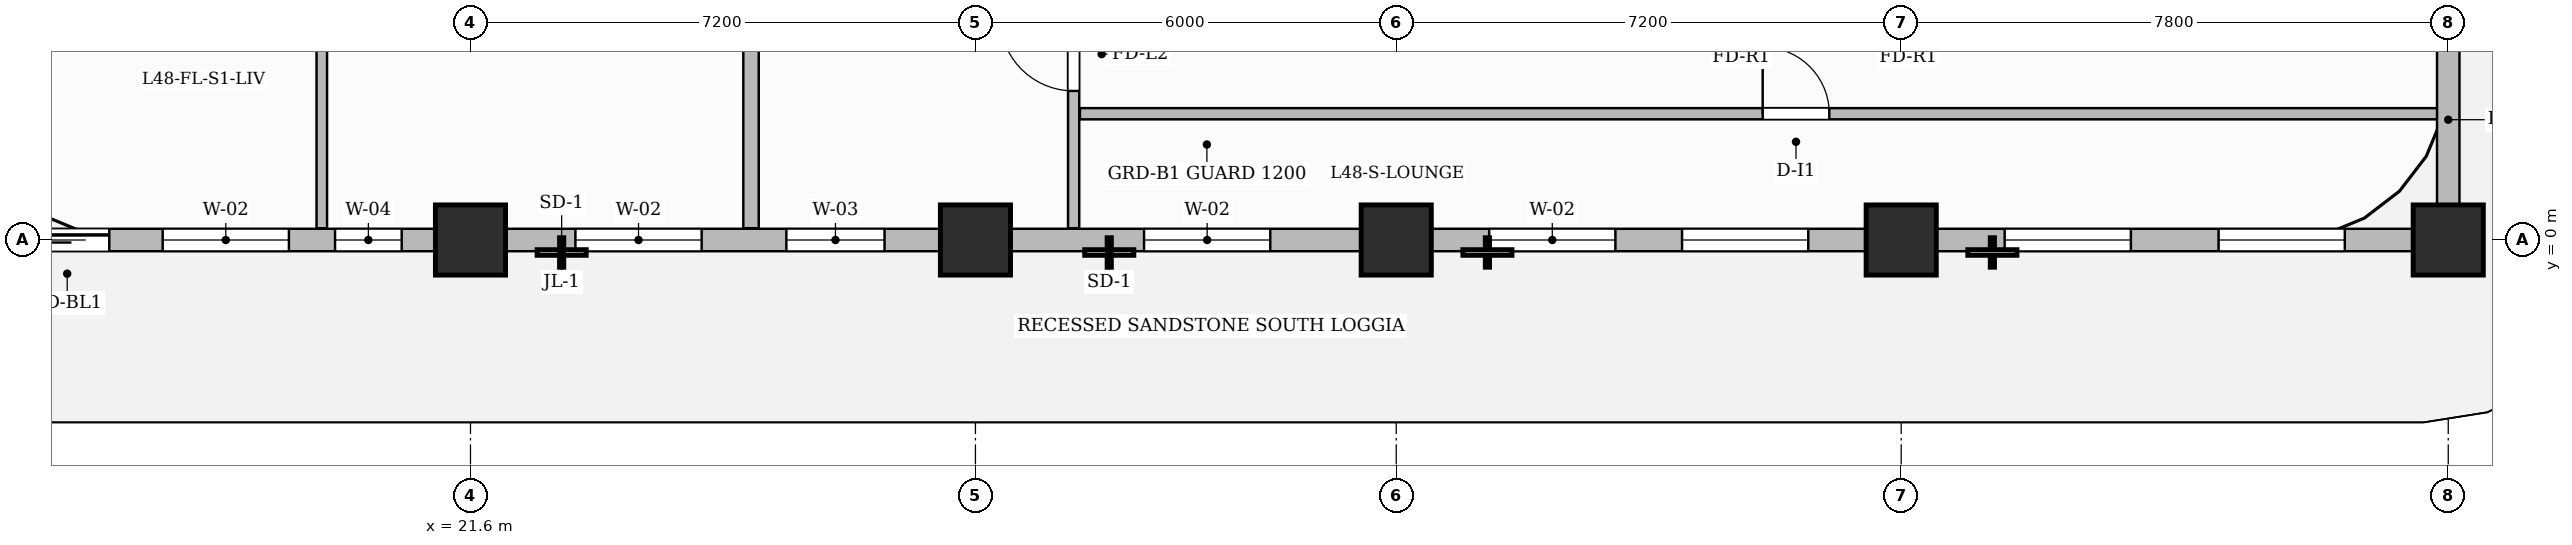
"""IFC4 building model, lengths in metres.
Left out: names, types, materials, properties, quantities, classifications, styles, units other than length and angle.
Written with IfcOpenShell. Run it as: python <this file> out.ifc"""

import sys

from ifc_helpers import new_model, si_unit, direction, frame, frame_2d, origin, origin_2d, place, context, subcontext, project, spatial, rectangle, extrude, source, transform, mapped, element, fill, save


model = new_model("IFC4")
c1 = context("Model", 3, precision=1e-05, world=origin(), true_north=direction((0.0, 1.0)))
c2 = subcontext(c1, "Body", "Model", "MODEL_VIEW")
j1 = project(units=[si_unit("LENGTHUNIT", "METRE"), si_unit("PLANEANGLEUNIT", "RADIAN")], contexts=[c1])
p1 = place(None, origin())
s1 = spatial("IfcSite", under=j1, at=p1, CompositionType="ELEMENT")
p2 = place(p1, origin())
s2 = spatial("IfcBuilding", under=s1, at=p2, CompositionType="ELEMENT")
p3 = place(p2, frame((0.0, 0.0, 192.65)))
s3 = spatial("IfcBuildingStorey", under=s2, at=p3, CompositionType="ELEMENT", Elevation=192.65)
m1 = source(origin(), c2, "Body", "SweptSolid", [
    extrude(rectangle(XDim=1.0, YDim=1.0, at=origin_2d()), origin(), (0.0, 0.0, 1.0), 3.85),
])
for number, where, z_axis, x_axis in (
    (1, (21.6, 0.0, 0.0), (0.0, 0.0, 1.0), (1.0, 0.0, 0.0)),
    (2, (28.8, 0.0, 0.0), (0.0, 0.0, 1.0), (1.0, 0.0, 0.0)),
    (3, (34.8, 0.0, 0.0), (0.0, 0.0, 1.0), (1.0, 0.0, 0.0)),
    (4, (42.0, 0.0, 0.0), (0.0, 0.0, 1.0), (1.0, 0.0, 0.0)),
    (5, (49.8, 0.0, 0.0), (0.0, 0.0, 1.0), (1.0, 0.0, 0.0)),
):
    element("IfcColumn", number, at=place(p3, frame(where, z_axis=z_axis, x_axis=x_axis)), inside=s3, PredefinedType="COLUMN", context=c2, shape_type="MappedRepresentation", body=[
        mapped(m1, transform((0.0, 0.0, 0.0), scale=1.0)),
    ])
p4 = place(p3, frame((30.2, 0.168, 0.0), z_axis=(0.0, 0.0, 1.0), x_axis=(0.0, 1.0, 0.0)))
e6 = element("IfcWall", 6, at=p4, inside=s3, PredefinedType="PARTITIONING", context=c2, shape_type="SweptSolid", body=[
    extrude(rectangle(XDim=9.892, YDim=0.16, at=frame_2d((4.946, 0.0))), origin(), (0.0, 0.0, 1.0), 3.55),
])
p5 = place(p4, frame((1.957, 0.0, 0.0)))
e7 = element("IfcOpeningElement", 7, at=p5, cuts=e6, PredefinedType="OPENING", context=c2, shape_type="SweptSolid", body=[
    extrude(rectangle(XDim=1.05, YDim=2.15, at=frame_2d((0.525, 1.075))), frame((0.0, 0.09, 0.0), z_axis=(0.0, -1.0, 0.0), x_axis=(1.0, 0.0, 0.0)), (0.0, 0.0, 1.0), 0.18),
])
p6 = place(p3, frame((30.29, 1.8, 0.0), z_axis=(0.0, 0.0, 1.0), x_axis=(1.0, 0.0, 0.0)))
e8 = element("IfcWall", 8, at=p6, inside=s3, PredefinedType="PARTITIONING", context=c2, shape_type="SweptSolid", body=[
    extrude(rectangle(XDim=19.37, YDim=0.16, at=frame_2d((9.685, 0.0))), origin(), (0.0, 0.0, 1.0), 3.55),
])
p7 = place(p6, frame((9.735, 0.0, 0.0)))
e9 = element("IfcOpeningElement", 9, at=p7, cuts=e8, PredefinedType="OPENING", context=c2, shape_type="SweptSolid", body=[
    extrude(rectangle(XDim=0.95, YDim=2.15, at=frame_2d((0.475, 1.075))), frame((0.0, 0.09, 0.0), z_axis=(0.0, -1.0, 0.0), x_axis=(1.0, 0.0, 0.0)), (0.0, 0.0, 1.0), 0.18),
])
p8 = place(p3, frame((25.6, 0.168, 0.0), z_axis=(0.0, 0.0, 1.0), x_axis=(0.0, 1.0, 0.0)))
e10 = element("IfcWall", 10, at=p8, inside=s3, PredefinedType="PARTITIONING", context=c2, shape_type="SweptSolid", body=[
    extrude(rectangle(XDim=9.892, YDim=0.22, at=frame_2d((4.946, 0.0))), origin(), (0.0, 0.0, 1.0), 3.55),
])
p9 = place(p3, frame((19.48, 0.168, 0.0), z_axis=(0.0, 0.0, 1.0), x_axis=(0.0, 1.0, 0.0)))
e11 = element("IfcWall", 11, at=p9, inside=s3, PredefinedType="PARTITIONING", context=c2, shape_type="SweptSolid", body=[
    extrude(rectangle(XDim=9.892, YDim=0.15, at=frame_2d((4.946, 0.0))), origin(), (0.0, 0.0, 1.0), 3.55),
])
p10 = place(p9, frame((8.457, 0.0, 0.0)))
e12 = element("IfcOpeningElement", 12, at=p10, cuts=e11, PredefinedType="OPENING", context=c2, shape_type="SweptSolid", body=[
    extrude(rectangle(XDim=0.9, YDim=2.15, at=frame_2d((0.45, 1.075))), frame((0.0, 0.085, 0.0), z_axis=(0.0, -1.0, 0.0), x_axis=(1.0, 0.0, 0.0)), (0.0, 0.0, 1.0), 0.17),
])
p11 = place(p3, frame((14.4, 0.0, 0.0), z_axis=(0.0, 0.0, 1.0), x_axis=(1.0, 0.0, 0.0)))
e13 = element("IfcWall", 13, at=p11, inside=s3, PredefinedType="SOLIDWALL", context=c2, shape_type="SweptSolid", body=[
    extrude(rectangle(XDim=35.4, YDim=0.32, at=frame_2d((17.7, 0.0))), origin(), (0.0, 0.0, 1.0), 3.035),
])
p12 = place(p11, frame((0.85, 0.0, 0.0)))
e14 = element("IfcOpeningElement", 14, at=p12, cuts=e13, PredefinedType="OPENING", context=c2, shape_type="SweptSolid", body=[
    extrude(rectangle(XDim=1.2, YDim=2.2, at=frame_2d((0.6, 1.1))), frame((0.0, 0.17, 0.0), z_axis=(0.0, -1.0, 0.0), x_axis=(1.0, 0.0, 0.0)), (0.0, 0.0, 1.0), 0.34),
])
p13 = place(p11, frame((2.811, 0.0, 0.8)))
e15 = element("IfcOpeningElement", 15, at=p13, cuts=e13, PredefinedType="OPENING", context=c2, shape_type="SweptSolid", body=[
    extrude(rectangle(XDim=1.8, YDim=1.85, at=frame_2d((0.9, 0.925))), frame((0.0, 0.17, 0.0), z_axis=(0.0, -1.0, 0.0), x_axis=(1.0, 0.0, 0.0)), (0.0, 0.0, 1.0), 0.34),
])
p14 = place(p11, frame((5.269, 0.0, 0.8)))
e16 = element("IfcOpeningElement", 16, at=p14, cuts=e13, PredefinedType="OPENING", context=c2, shape_type="SweptSolid", body=[
    extrude(rectangle(XDim=0.95, YDim=1.75, at=frame_2d((0.475, 0.875))), frame((0.0, 0.17, 0.0), z_axis=(0.0, -1.0, 0.0), x_axis=(1.0, 0.0, 0.0)), (0.0, 0.0, 1.0), 0.34),
])
p15 = place(p11, frame((8.696, 0.0, 0.8)))
e17 = element("IfcOpeningElement", 17, at=p15, cuts=e13, PredefinedType="OPENING", context=c2, shape_type="SweptSolid", body=[
    extrude(rectangle(XDim=1.8, YDim=1.85, at=frame_2d((0.9, 0.925))), frame((0.0, 0.17, 0.0), z_axis=(0.0, -1.0, 0.0), x_axis=(1.0, 0.0, 0.0)), (0.0, 0.0, 1.0), 0.34),
])
p16 = place(p11, frame((11.704, 0.0, 0.8)))
e18 = element("IfcOpeningElement", 18, at=p16, cuts=e13, PredefinedType="OPENING", context=c2, shape_type="SweptSolid", body=[
    extrude(rectangle(XDim=1.4, YDim=1.85, at=frame_2d((0.7, 0.925))), frame((0.0, 0.17, 0.0), z_axis=(0.0, -1.0, 0.0), x_axis=(1.0, 0.0, 0.0)), (0.0, 0.0, 1.0), 0.34),
])
p17 = place(p11, frame((16.804, 0.0, 0.8)))
e19 = element("IfcOpeningElement", 19, at=p17, cuts=e13, PredefinedType="OPENING", context=c2, shape_type="SweptSolid", body=[
    extrude(rectangle(XDim=1.8, YDim=1.85, at=frame_2d((0.9, 0.925))), frame((0.0, 0.17, 0.0), z_axis=(0.0, -1.0, 0.0), x_axis=(1.0, 0.0, 0.0)), (0.0, 0.0, 1.0), 0.34),
])
p18 = place(p11, frame((21.725, 0.0, 0.8)))
e20 = element("IfcOpeningElement", 20, at=p18, cuts=e13, PredefinedType="OPENING", context=c2, shape_type="SweptSolid", body=[
    extrude(rectangle(XDim=1.8, YDim=1.85, at=frame_2d((0.9, 0.925))), frame((0.0, 0.17, 0.0), z_axis=(0.0, -1.0, 0.0), x_axis=(1.0, 0.0, 0.0)), (0.0, 0.0, 1.0), 0.34),
])
p19 = place(p11, frame((24.475, 0.0, 0.8)))
e21 = element("IfcOpeningElement", 21, at=p19, cuts=e13, PredefinedType="OPENING", context=c2, shape_type="SweptSolid", body=[
    extrude(rectangle(XDim=1.8, YDim=1.85, at=frame_2d((0.9, 0.925))), frame((0.0, 0.17, 0.0), z_axis=(0.0, -1.0, 0.0), x_axis=(1.0, 0.0, 0.0)), (0.0, 0.0, 1.0), 0.34),
])
p20 = place(p11, frame((29.075, 0.0, 0.8)))
e22 = element("IfcOpeningElement", 22, at=p20, cuts=e13, PredefinedType="OPENING", context=c2, shape_type="SweptSolid", body=[
    extrude(rectangle(XDim=1.8, YDim=1.85, at=frame_2d((0.9, 0.925))), frame((0.0, 0.17, 0.0), z_axis=(0.0, -1.0, 0.0), x_axis=(1.0, 0.0, 0.0)), (0.0, 0.0, 1.0), 0.34),
])
p21 = place(p11, frame((32.125, 0.0, 0.8)))
e23 = element("IfcOpeningElement", 23, at=p21, cuts=e13, PredefinedType="OPENING", context=c2, shape_type="SweptSolid", body=[
    extrude(rectangle(XDim=1.8, YDim=1.85, at=frame_2d((0.9, 0.925))), frame((0.0, 0.17, 0.0), z_axis=(0.0, -1.0, 0.0), x_axis=(1.0, 0.0, 0.0)), (0.0, 0.0, 1.0), 0.34),
])
p22 = place(p3, frame((49.8, 0.05, 0.0), z_axis=(0.0, 0.0, 1.0), x_axis=(0.0, 1.0, 0.0)))
e24 = element("IfcWall", 24, at=p22, inside=s3, PredefinedType="SOLIDWALL", context=c2, shape_type="SweptSolid", body=[
    extrude(rectangle(XDim=3.33, YDim=0.32, at=frame_2d((1.665, 0.0))), origin(), (0.0, 0.0, 1.0), 3.55),
])
m2 = source(origin(), c2, "Body", "SweptSolid", [
    extrude(rectangle(XDim=1.05, YDim=2.15, at=frame_2d((0.525, 1.075))), frame((0.0, 0.025, 0.0), z_axis=(0.0, -1.0, 0.0), x_axis=(1.0, 0.0, 0.0)), (0.0, 0.0, 1.0), 0.05),
])
p23 = place(p5, origin())
e25 = element("IfcDoor", 25, at=p23, inside=s3, OperationType="SINGLE_SWING_RIGHT", PredefinedType="DOOR", context=c2, shape_type="MappedRepresentation", body=[
    mapped(m2, transform((0.0, 0.0, 0.0), scale=1.0)),
])
fill(e7, e25)
m3 = source(origin(), c2, "Body", "SweptSolid", [
    extrude(rectangle(XDim=0.95, YDim=2.15, at=frame_2d((0.475, 1.075))), frame((0.0, 0.025, 0.0), z_axis=(0.0, -1.0, 0.0), x_axis=(1.0, 0.0, 0.0)), (0.0, 0.0, 1.0), 0.05),
])
p24 = place(p7, origin())
e26 = element("IfcDoor", 26, at=p24, inside=s3, OperationType="SINGLE_SWING_LEFT", PredefinedType="DOOR", context=c2, shape_type="MappedRepresentation", body=[
    mapped(m3, transform((0.0, 0.0, 0.0), scale=1.0)),
])
fill(e9, e26)
m4 = source(origin(), c2, "Body", "SweptSolid", [
    extrude(rectangle(XDim=1.2, YDim=2.2, at=frame_2d((0.6, 1.1))), frame((0.0, 0.025, 0.0), z_axis=(0.0, -1.0, 0.0), x_axis=(1.0, 0.0, 0.0)), (0.0, 0.0, 1.0), 0.05),
])
p25 = place(p12, origin())
e27 = element("IfcDoor", 27, at=p25, inside=s3, OperationType="SLIDING_TO_LEFT", PredefinedType="DOOR", context=c2, shape_type="MappedRepresentation", body=[
    mapped(m4, transform((0.0, 0.0, 0.0), scale=1.0)),
])
fill(e14, e27)
m5 = source(origin(), c2, "Body", "SweptSolid", [
    extrude(rectangle(XDim=1.8, YDim=1.85, at=frame_2d((0.9, 0.925))), frame((0.0, 0.03, 0.0), z_axis=(0.0, -1.0, 0.0), x_axis=(1.0, 0.0, 0.0)), (0.0, 0.0, 1.0), 0.06),
])
p26 = place(p13, origin())
e28 = element("IfcWindow", 28, at=p26, inside=s3, PartitioningType="DOUBLE_PANEL_VERTICAL", PredefinedType="WINDOW", context=c2, shape_type="MappedRepresentation", body=[
    mapped(m5, transform((0.0, 0.0, 0.0), scale=1.0)),
])
fill(e15, e28)
m6 = source(origin(), c2, "Body", "SweptSolid", [
    extrude(rectangle(XDim=0.95, YDim=1.75, at=frame_2d((0.475, 0.875))), frame((0.0, 0.03, 0.0), z_axis=(0.0, -1.0, 0.0), x_axis=(1.0, 0.0, 0.0)), (0.0, 0.0, 1.0), 0.06),
])
p27 = place(p14, origin())
e29 = element("IfcWindow", 29, at=p27, inside=s3, PartitioningType="SINGLE_PANEL", PredefinedType="WINDOW", context=c2, shape_type="MappedRepresentation", body=[
    mapped(m6, transform((0.0, 0.0, 0.0), scale=1.0)),
])
fill(e16, e29)
p28 = place(p15, origin())
e30 = element("IfcWindow", 30, at=p28, inside=s3, PartitioningType="DOUBLE_PANEL_VERTICAL", PredefinedType="WINDOW", context=c2, shape_type="MappedRepresentation", body=[
    mapped(m5, transform((0.0, 0.0, 0.0), scale=1.0)),
])
fill(e17, e30)
m7 = source(origin(), c2, "Body", "SweptSolid", [
    extrude(rectangle(XDim=1.4, YDim=1.85, at=frame_2d((0.7, 0.925))), frame((0.0, 0.03, 0.0), z_axis=(0.0, -1.0, 0.0), x_axis=(1.0, 0.0, 0.0)), (0.0, 0.0, 1.0), 0.06),
])
p29 = place(p16, origin())
e31 = element("IfcWindow", 31, at=p29, inside=s3, PartitioningType="SINGLE_PANEL", PredefinedType="WINDOW", context=c2, shape_type="MappedRepresentation", body=[
    mapped(m7, transform((0.0, 0.0, 0.0), scale=1.0)),
])
fill(e18, e31)
p30 = place(p17, origin())
e32 = element("IfcWindow", 32, at=p30, inside=s3, PartitioningType="DOUBLE_PANEL_VERTICAL", PredefinedType="WINDOW", context=c2, shape_type="MappedRepresentation", body=[
    mapped(m5, transform((0.0, 0.0, 0.0), scale=1.0)),
])
fill(e19, e32)
p31 = place(p18, origin())
e33 = element("IfcWindow", 33, at=p31, inside=s3, PartitioningType="DOUBLE_PANEL_VERTICAL", PredefinedType="WINDOW", context=c2, shape_type="MappedRepresentation", body=[
    mapped(m5, transform((0.0, 0.0, 0.0), scale=1.0)),
])
fill(e20, e33)
p32 = place(p19, origin())
e34 = element("IfcWindow", 34, at=p32, inside=s3, PartitioningType="DOUBLE_PANEL_VERTICAL", PredefinedType="WINDOW", context=c2, shape_type="MappedRepresentation", body=[
    mapped(m5, transform((0.0, 0.0, 0.0), scale=1.0)),
])
fill(e21, e34)
p33 = place(p20, origin())
e35 = element("IfcWindow", 35, at=p33, inside=s3, PartitioningType="DOUBLE_PANEL_VERTICAL", PredefinedType="WINDOW", context=c2, shape_type="MappedRepresentation", body=[
    mapped(m5, transform((0.0, 0.0, 0.0), scale=1.0)),
])
fill(e22, e35)
p34 = place(p21, origin())
e36 = element("IfcWindow", 36, at=p34, inside=s3, PartitioningType="DOUBLE_PANEL_VERTICAL", PredefinedType="WINDOW", context=c2, shape_type="MappedRepresentation", body=[
    mapped(m5, transform((0.0, 0.0, 0.0), scale=1.0)),
])
fill(e23, e36)
save(model, sys.argv[1])
